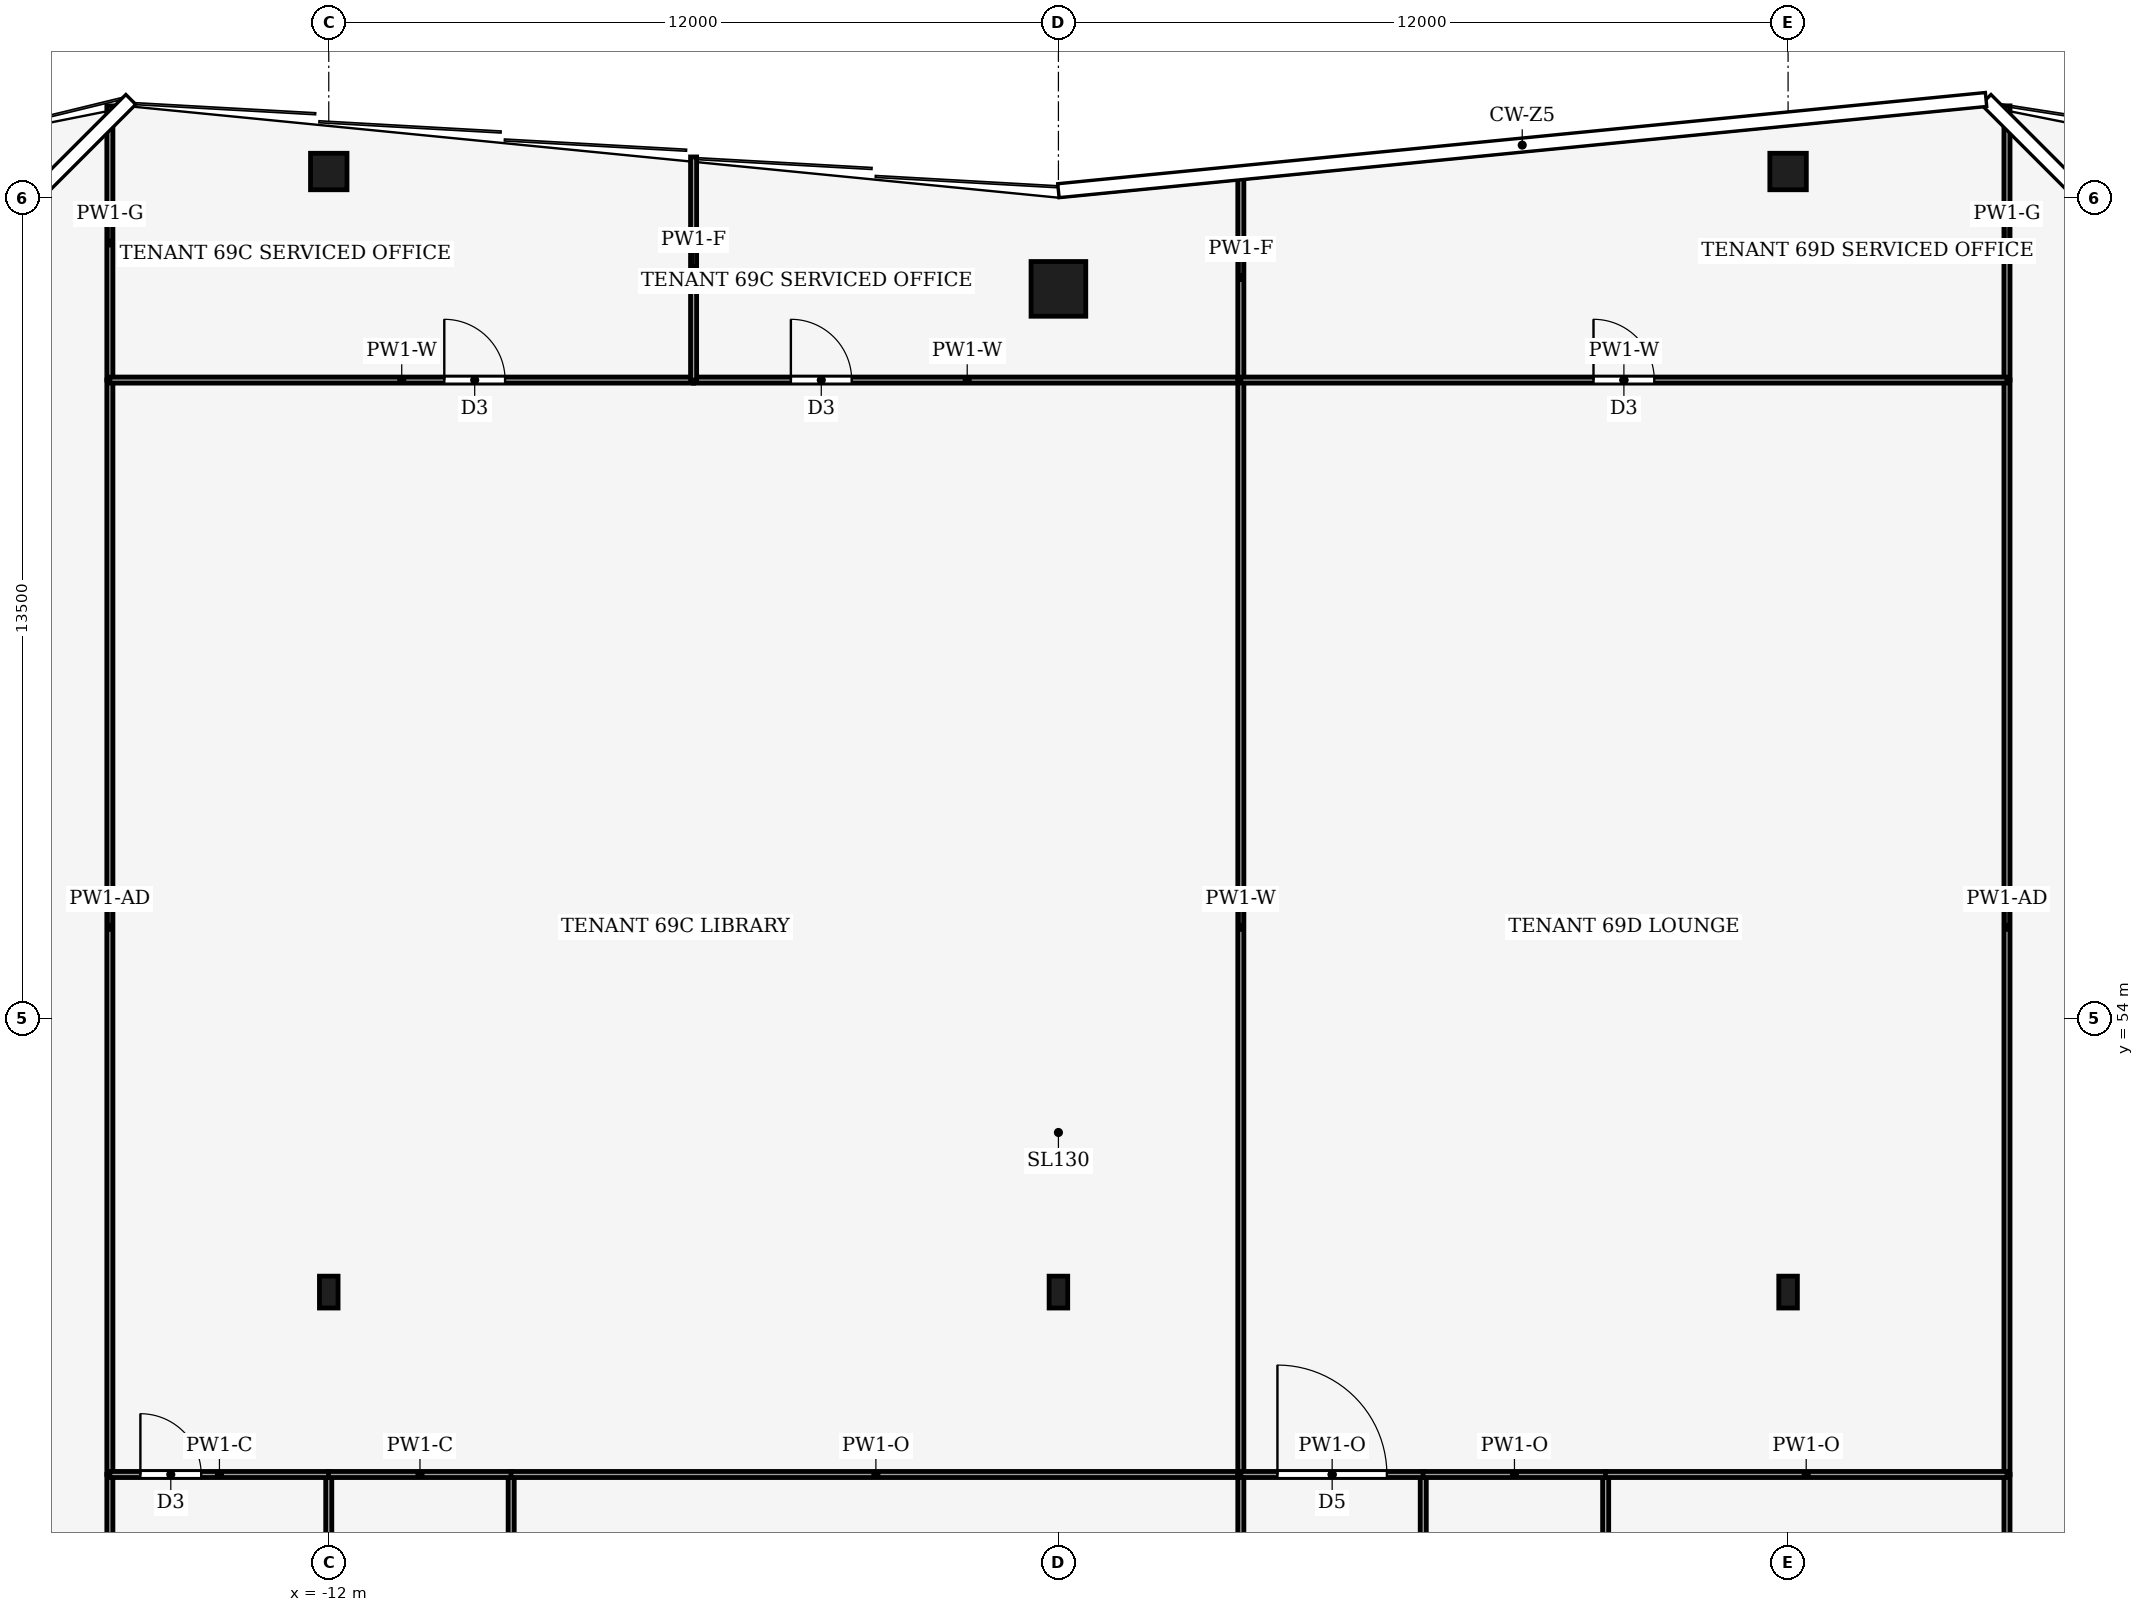
"""IFC4 building model, lengths in metres.
Left out: names, types, materials, properties, quantities, classifications, styles, units other than length and angle.
Written with IfcOpenShell. Run it as: python <this file> out.ifc"""

import sys

from ifc_helpers import new_model, si_unit, direction, frame, frame_2d, origin, origin_2d, place, context, subcontext, project, spatial, rectangle, hollow_rectangle, i_section, extrude, element, fill, save


model = new_model("IFC4")
c1 = context("Model", 3, precision=1e-05, world=origin(), true_north=direction((0.0, 1.0)))
c2 = subcontext(c1, "Body", "Model", "MODEL_VIEW")
j1 = project(units=[si_unit("LENGTHUNIT", "METRE"), si_unit("PLANEANGLEUNIT", "RADIAN")], contexts=[c1])
p1 = place(None, origin())
s1 = spatial("IfcSite", under=j1, at=p1, CompositionType="ELEMENT")
p2 = place(p1, origin())
s2 = spatial("IfcBuilding", under=s1, at=p2, CompositionType="ELEMENT")
p3 = place(p2, frame((0.0, 0.0, 302.0)))
s3 = spatial("IfcBuildingStorey", under=s2, at=p3, CompositionType="ELEMENT", Elevation=302.0)
p4 = place(p3, frame((0.0, 66.0, 0.0), z_axis=(0.0, 0.0, 1.0), x_axis=(1.0, 0.0, 0.0)))
e1 = element("IfcColumn", 1, at=p4, inside=s3, PredefinedType="COLUMN", context=c2, shape_type="SweptSolid", body=[
    extrude(hollow_rectangle(XDim=0.9, YDim=0.9, WallThickness=0.04, at=origin_2d()), origin(), (0.0, 0.0, 1.0), 4.0),
])
for number, where, z_axis, x_axis in (
    (2, (-12.0, 67.93, 0.0), (0.0, 0.0, 1.0), (1.0, 0.0, 0.0)),
    (3, (12.0, 67.93, 0.0), (0.0, 0.0, 1.0), (1.0, 0.0, 0.0)),
):
    element("IfcColumn", number, at=place(p3, frame(where, z_axis=z_axis, x_axis=x_axis)), inside=s3, PredefinedType="COLUMN", context=c2, shape_type="SweptSolid", body=[
        extrude(hollow_rectangle(XDim=0.6, YDim=0.6, WallThickness=0.025, at=origin_2d()), origin(), (0.0, 0.0, 1.0), 4.0),
    ])
for number, where, z_axis, x_axis in (
    (4, (-12.0, 49.5, 0.0), (0.0, 0.0, 1.0), (1.0, 0.0, 0.0)),
    (5, (0.0, 49.5, 0.0), (0.0, 0.0, 1.0), (1.0, 0.0, 0.0)),
    (6, (12.0, 49.5, 0.0), (0.0, 0.0, 1.0), (1.0, 0.0, 0.0)),
):
    element("IfcColumn", number, at=place(p3, frame(where, z_axis=z_axis, x_axis=x_axis)), inside=s3, PredefinedType="COLUMN", context=c2, shape_type="SweptSolid", body=[
        extrude(i_section(OverallWidth=0.306, OverallDepth=0.524, WebThickness=0.012, FlangeThickness=0.04, FilletRadius=0.027, at=origin_2d()), origin(), (0.0, 0.0, 1.0), 4.0),
    ])
p5 = place(p3, frame((-15.6, 40.6, 0.0), z_axis=(0.0, 0.0, 1.0), x_axis=(0.0, 1.0, 0.0)))
e7 = element("IfcWall", 7, at=p5, inside=s3, PredefinedType="PARTITIONING", context=c2, shape_type="SweptSolid", body=[
    extrude(rectangle(XDim=5.9, YDim=0.1, at=frame_2d((2.95, 0.0))), origin(), (0.0, 0.0, 1.0), 3.87),
])
p6 = place(p3, frame((-15.6, 46.5, 0.0), z_axis=(0.0, 0.0, 1.0), x_axis=(0.0, 1.0, 0.0)))
e8 = element("IfcWall", 8, at=p6, inside=s3, PredefinedType="PARTITIONING", context=c2, shape_type="SweptSolid", body=[
    extrude(rectangle(XDim=18.0, YDim=0.1, at=frame_2d((9.0, 0.0))), origin(), (0.0, 0.0, 1.0), 3.35),
])
p7 = place(p3, frame((-15.6, 64.5, 0.0), z_axis=(0.0, 0.0, 1.0), x_axis=(0.0, 1.0, 0.0)))
e9 = element("IfcWall", 9, at=p7, inside=s3, PredefinedType="PARTITIONING", context=c2, shape_type="SweptSolid", body=[
    extrude(rectangle(XDim=4.51, YDim=0.1, at=frame_2d((2.255, 0.0))), origin(), (0.0, 0.0, 1.0), 2.93),
])
p8 = place(p3, frame((15.6, 46.5, 0.0), z_axis=(0.0, 0.0, 1.0), x_axis=(0.0, -1.0, 0.0)))
e10 = element("IfcWall", 10, at=p8, inside=s3, PredefinedType="PARTITIONING", context=c2, shape_type="SweptSolid", body=[
    extrude(rectangle(XDim=5.9, YDim=0.1, at=frame_2d((2.95, 0.0))), origin(), (0.0, 0.0, 1.0), 3.87),
])
p9 = place(p3, frame((15.6, 64.5, 0.0), z_axis=(0.0, 0.0, 1.0), x_axis=(0.0, -1.0, 0.0)))
e11 = element("IfcWall", 11, at=p9, inside=s3, PredefinedType="PARTITIONING", context=c2, shape_type="SweptSolid", body=[
    extrude(rectangle(XDim=18.0, YDim=0.1, at=frame_2d((9.0, 0.0))), origin(), (0.0, 0.0, 1.0), 3.35),
])
p10 = place(p3, frame((15.6, 69.01, 0.0), z_axis=(0.0, 0.0, 1.0), x_axis=(0.0, -1.0, 0.0)))
e12 = element("IfcWall", 12, at=p10, inside=s3, PredefinedType="PARTITIONING", context=c2, shape_type="SweptSolid", body=[
    extrude(rectangle(XDim=4.51, YDim=0.1, at=frame_2d((2.255, 0.0))), origin(), (0.0, 0.0, 1.0), 2.93),
])
p11 = place(p3, frame((-12.0, 46.5, 0.0), z_axis=(0.0, 0.0, 1.0), x_axis=(0.0, -1.0, 0.0)))
e13 = element("IfcWall", 13, at=p11, inside=s3, PredefinedType="PARTITIONING", context=c2, shape_type="SweptSolid", body=[
    extrude(rectangle(XDim=5.9, YDim=0.1, at=frame_2d((2.95, 0.0))), origin(), (0.0, 0.0, 1.0), 3.39),
])
p12 = place(p11, frame((2.45, 0.0, 0.0)))
e14 = element("IfcOpeningElement", 14, at=p12, cuts=e13, PredefinedType="OPENING", context=c2, shape_type="SweptSolid", body=[
    extrude(rectangle(XDim=1.0, YDim=2.1, at=frame_2d((0.5, 1.05))), frame((0.0, 0.06, 0.0), z_axis=(0.0, -1.0, 0.0), x_axis=(1.0, 0.0, 0.0)), (0.0, 0.0, 1.0), 0.12),
])
p13 = place(p3, frame((-15.6, 46.5, 0.0), z_axis=(0.0, 0.0, 1.0), x_axis=(1.0, 0.0, 0.0)))
e15 = element("IfcWall", 15, at=p13, inside=s3, PredefinedType="PARTITIONING", context=c2, shape_type="SweptSolid", body=[
    extrude(rectangle(XDim=3.604, YDim=0.1, at=frame_2d((1.802, 0.0))), origin(), (0.0, 0.0, 1.0), 3.87),
])
p14 = place(p13, frame((0.502, 0.0, 0.0)))
e16 = element("IfcOpeningElement", 16, at=p14, cuts=e15, PredefinedType="OPENING", context=c2, shape_type="SweptSolid", body=[
    extrude(rectangle(XDim=1.0, YDim=2.1, at=frame_2d((0.5, 1.05))), frame((0.0, 0.06, 0.0), z_axis=(0.0, -1.0, 0.0), x_axis=(1.0, 0.0, 0.0)), (0.0, 0.0, 1.0), 0.12),
])
p15 = place(p3, frame((-9.0, 40.6, 0.0), z_axis=(0.0, 0.0, 1.0), x_axis=(0.0, 1.0, 0.0)))
e17 = element("IfcWall", 17, at=p15, inside=s3, PredefinedType="PARTITIONING", context=c2, shape_type="SweptSolid", body=[
    extrude(rectangle(XDim=5.9, YDim=0.1, at=frame_2d((2.95, 0.0))), origin(), (0.0, 0.0, 1.0), 3.87),
])
p16 = place(p3, frame((-8.996, 46.5, 0.0), z_axis=(0.0, 0.0, 1.0), x_axis=(-1.0, 0.0, 0.0)))
e18 = element("IfcWall", 18, at=p16, inside=s3, PredefinedType="PARTITIONING", context=c2, shape_type="SweptSolid", body=[
    extrude(rectangle(XDim=3.008, YDim=0.1, at=frame_2d((1.504, 0.0))), origin(), (0.0, 0.0, 1.0), 3.87),
])
p17 = place(p3, frame((3.0, 46.5, 0.0), z_axis=(0.0, 0.0, 1.0), x_axis=(-1.0, 0.0, 0.0)))
e19 = element("IfcWall", 19, at=p17, inside=s3, PredefinedType="PARTITIONING", context=c2, shape_type="SweptSolid", body=[
    extrude(rectangle(XDim=12.004, YDim=0.1, at=frame_2d((6.002, 0.0))), origin(), (0.0, 0.0, 1.0), 3.39),
])
p18 = place(p3, frame((3.0, 40.6, 0.0), z_axis=(0.0, 0.0, 1.0), x_axis=(0.0, 1.0, 0.0)))
e20 = element("IfcWall", 20, at=p18, inside=s3, PredefinedType="PARTITIONING", context=c2, shape_type="SweptSolid", body=[
    extrude(rectangle(XDim=5.9, YDim=0.1, at=frame_2d((2.95, 0.0))), origin(), (0.0, 0.0, 1.0), 3.87),
])
p19 = place(p3, frame((-15.6, 64.5, 0.0), z_axis=(0.0, 0.0, 1.0), x_axis=(1.0, 0.0, 0.0)))
e21 = element("IfcWall", 21, at=p19, inside=s3, PredefinedType="PARTITIONING", context=c2, shape_type="SweptSolid", body=[
    extrude(rectangle(XDim=9.6, YDim=0.1, at=frame_2d((4.8, 0.0))), origin(), (0.0, 0.0, 1.0), 3.24),
])
p20 = place(p19, frame((5.5, 0.0, 0.0)))
e22 = element("IfcOpeningElement", 22, at=p20, cuts=e21, PredefinedType="OPENING", context=c2, shape_type="SweptSolid", body=[
    extrude(rectangle(XDim=1.0, YDim=2.1, at=frame_2d((0.5, 1.05))), frame((0.0, 0.06, 0.0), z_axis=(0.0, -1.0, 0.0), x_axis=(1.0, 0.0, 0.0)), (0.0, 0.0, 1.0), 0.12),
])
p21 = place(p3, frame((-6.0, 64.5, 0.0), z_axis=(0.0, 0.0, 1.0), x_axis=(1.0, 0.0, 0.0)))
e23 = element("IfcWall", 23, at=p21, inside=s3, PredefinedType="PARTITIONING", context=c2, shape_type="SweptSolid", body=[
    extrude(rectangle(XDim=9.0, YDim=0.1, at=frame_2d((4.5, 0.0))), origin(), (0.0, 0.0, 1.0), 3.24),
])
p22 = place(p21, frame((1.6, 0.0, 0.0)))
e24 = element("IfcOpeningElement", 24, at=p22, cuts=e23, PredefinedType="OPENING", context=c2, shape_type="SweptSolid", body=[
    extrude(rectangle(XDim=1.0, YDim=2.1, at=frame_2d((0.5, 1.05))), frame((0.0, 0.06, 0.0), z_axis=(0.0, -1.0, 0.0), x_axis=(1.0, 0.0, 0.0)), (0.0, 0.0, 1.0), 0.12),
])
p23 = place(p3, frame((3.0, 46.5, 0.0), z_axis=(0.0, 0.0, 1.0), x_axis=(0.0, 1.0, 0.0)))
e25 = element("IfcWall", 25, at=p23, inside=s3, PredefinedType="PARTITIONING", context=c2, shape_type="SweptSolid", body=[
    extrude(rectangle(XDim=18.0, YDim=0.1, at=frame_2d((9.0, 0.0))), origin(), (0.0, 0.0, 1.0), 3.24),
])
p24 = place(p3, frame((-6.0, 64.5, 0.0), z_axis=(0.0, 0.0, 1.0), x_axis=(0.0, 1.0, 0.0)))
e26 = element("IfcWall", 26, at=p24, inside=s3, PredefinedType="PARTITIONING", context=c2, shape_type="SweptSolid", body=[
    extrude(rectangle(XDim=3.67, YDim=0.1, at=frame_2d((1.835, 0.0))), origin(), (0.0, 0.0, 1.0), 3.04),
])
p25 = place(p3, frame((3.0, 64.5, 0.0), z_axis=(0.0, 0.0, 1.0), x_axis=(0.0, 1.0, 0.0)))
e27 = element("IfcWall", 27, at=p25, inside=s3, PredefinedType="PARTITIONING", context=c2, shape_type="SweptSolid", body=[
    extrude(rectangle(XDim=3.375, YDim=0.1, at=frame_2d((1.688, 0.0))), origin(), (0.0, 0.0, 1.0), 3.04),
])
p26 = place(p3, frame((6.0, 46.5, 0.0), z_axis=(0.0, 0.0, 1.0), x_axis=(0.0, -1.0, 0.0)))
e28 = element("IfcWall", 28, at=p26, inside=s3, PredefinedType="PARTITIONING", context=c2, shape_type="SweptSolid", body=[
    extrude(rectangle(XDim=5.9, YDim=0.1, at=frame_2d((2.95, 0.0))), origin(), (0.0, 0.0, 1.0), 3.87),
])
p27 = place(p26, frame((2.45, 0.0, 0.0)))
e29 = element("IfcOpeningElement", 29, at=p27, cuts=e28, PredefinedType="OPENING", context=c2, shape_type="SweptSolid", body=[
    extrude(rectangle(XDim=1.0, YDim=2.1, at=frame_2d((0.5, 1.05))), frame((0.0, 0.06, 0.0), z_axis=(0.0, -1.0, 0.0), x_axis=(1.0, 0.0, 0.0)), (0.0, 0.0, 1.0), 0.12),
])
p28 = place(p3, frame((3.0, 46.5, 0.0), z_axis=(0.0, 0.0, 1.0), x_axis=(1.0, 0.0, 0.0)))
e30 = element("IfcWall", 30, at=p28, inside=s3, PredefinedType="PARTITIONING", context=c2, shape_type="SweptSolid", body=[
    extrude(rectangle(XDim=3.004, YDim=0.1, at=frame_2d((1.502, 0.0))), origin(), (0.0, 0.0, 1.0), 3.39),
])
p29 = place(p28, frame((0.602, 0.0, 0.0)))
e31 = element("IfcOpeningElement", 31, at=p29, cuts=e30, PredefinedType="OPENING", context=c2, shape_type="SweptSolid", body=[
    extrude(rectangle(XDim=1.8, YDim=2.1, at=frame_2d((0.9, 1.05))), frame((0.0, 0.06, 0.0), z_axis=(0.0, -1.0, 0.0), x_axis=(1.0, 0.0, 0.0)), (0.0, 0.0, 1.0), 0.12),
])
p30 = place(p3, frame((9.0, 40.6, 0.0), z_axis=(0.0, 0.0, 1.0), x_axis=(0.0, 1.0, 0.0)))
e32 = element("IfcWall", 32, at=p30, inside=s3, PredefinedType="PARTITIONING", context=c2, shape_type="SweptSolid", body=[
    extrude(rectangle(XDim=5.9, YDim=0.1, at=frame_2d((2.95, 0.0))), origin(), (0.0, 0.0, 1.0), 3.87),
])
p31 = place(p3, frame((9.004, 46.5, 0.0), z_axis=(0.0, 0.0, 1.0), x_axis=(-1.0, 0.0, 0.0)))
e33 = element("IfcWall", 33, at=p31, inside=s3, PredefinedType="PARTITIONING", context=c2, shape_type="SweptSolid", body=[
    extrude(rectangle(XDim=3.008, YDim=0.1, at=frame_2d((1.504, 0.0))), origin(), (0.0, 0.0, 1.0), 3.39),
])
p32 = place(p3, frame((15.6, 46.5, 0.0), z_axis=(0.0, 0.0, 1.0), x_axis=(-1.0, 0.0, 0.0)))
e34 = element("IfcWall", 34, at=p32, inside=s3, PredefinedType="PARTITIONING", context=c2, shape_type="SweptSolid", body=[
    extrude(rectangle(XDim=6.604, YDim=0.1, at=frame_2d((3.302, 0.0))), origin(), (0.0, 0.0, 1.0), 3.39),
])
p33 = place(p3, frame((3.0, 64.5, 0.0), z_axis=(0.0, 0.0, 1.0), x_axis=(1.0, 0.0, 0.0)))
e35 = element("IfcWall", 35, at=p33, inside=s3, PredefinedType="PARTITIONING", context=c2, shape_type="SweptSolid", body=[
    extrude(rectangle(XDim=12.6, YDim=0.1, at=frame_2d((6.3, 0.0))), origin(), (0.0, 0.0, 1.0), 3.24),
])
p34 = place(p33, frame((5.8, 0.0, 0.0)))
e36 = element("IfcOpeningElement", 36, at=p34, cuts=e35, PredefinedType="OPENING", context=c2, shape_type="SweptSolid", body=[
    extrude(rectangle(XDim=1.0, YDim=2.1, at=frame_2d((0.5, 1.05))), frame((0.0, 0.06, 0.0), z_axis=(0.0, -1.0, 0.0), x_axis=(1.0, 0.0, 0.0)), (0.0, 0.0, 1.0), 0.12),
])
p35 = place(p14, origin())
e37 = element("IfcDoor", 37, at=p35, inside=s3, OperationType="SINGLE_SWING_LEFT", PredefinedType="DOOR", context=c2, shape_type="SweptSolid", body=[
    extrude(rectangle(XDim=1.0, YDim=2.1, at=frame_2d((0.5, 1.05))), frame((0.0, 0.025, 0.0), z_axis=(0.0, -1.0, 0.0), x_axis=(1.0, 0.0, 0.0)), (0.0, 0.0, 1.0), 0.05),
])
fill(e16, e37)
p36 = place(p20, origin())
e38 = element("IfcDoor", 38, at=p36, inside=s3, OperationType="SINGLE_SWING_RIGHT", PredefinedType="DOOR", context=c2, shape_type="SweptSolid", body=[
    extrude(rectangle(XDim=1.0, YDim=2.1, at=frame_2d((0.5, 1.05))), frame((0.0, 0.025, 0.0), z_axis=(0.0, -1.0, 0.0), x_axis=(1.0, 0.0, 0.0)), (0.0, 0.0, 1.0), 0.05),
])
fill(e22, e38)
p37 = place(p22, origin())
e39 = element("IfcDoor", 39, at=p37, inside=s3, OperationType="SINGLE_SWING_LEFT", PredefinedType="DOOR", context=c2, shape_type="SweptSolid", body=[
    extrude(rectangle(XDim=1.0, YDim=2.1, at=frame_2d((0.5, 1.05))), frame((0.0, 0.025, 0.0), z_axis=(0.0, -1.0, 0.0), x_axis=(1.0, 0.0, 0.0)), (0.0, 0.0, 1.0), 0.05),
])
fill(e24, e39)
p38 = place(p29, origin())
e40 = element("IfcDoor", 40, at=p38, inside=s3, OperationType="DOUBLE_DOOR_SINGLE_SWING", PredefinedType="DOOR", context=c2, shape_type="SweptSolid", body=[
    extrude(rectangle(XDim=1.8, YDim=2.1, at=frame_2d((0.9, 1.05))), frame((0.0, 0.025, 0.0), z_axis=(0.0, -1.0, 0.0), x_axis=(1.0, 0.0, 0.0)), (0.0, 0.0, 1.0), 0.05),
])
fill(e31, e40)
p39 = place(p34, origin())
e41 = element("IfcDoor", 41, at=p39, inside=s3, OperationType="SINGLE_SWING_LEFT", PredefinedType="DOOR", context=c2, shape_type="SweptSolid", body=[
    extrude(rectangle(XDim=1.0, YDim=2.1, at=frame_2d((0.5, 1.05))), frame((0.0, 0.025, 0.0), z_axis=(0.0, -1.0, 0.0), x_axis=(1.0, 0.0, 0.0)), (0.0, 0.0, 1.0), 0.05),
])
fill(e36, e41)
save(model, sys.argv[1])
